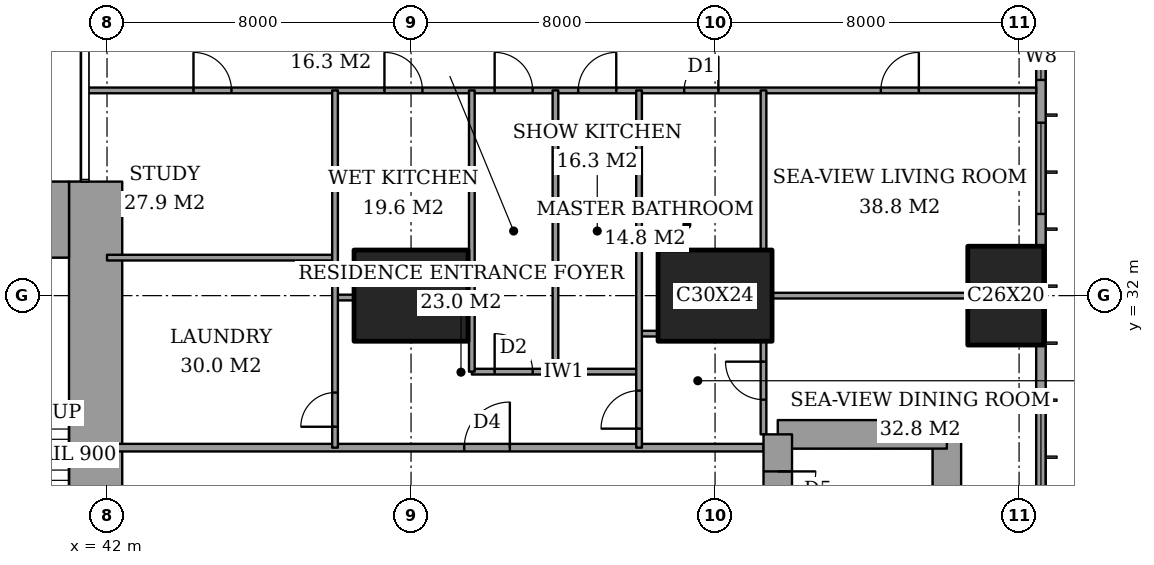
"""IFC4 building model, lengths in metres.
Left out: names, types, materials, properties, quantities, classifications, styles, units other than length and angle.
Written with IfcOpenShell. Run it as: python <this file> out.ifc"""

import sys

from ifc_helpers import new_model, si_unit, direction, frame, frame_2d, origin, origin_2d, place, context, subcontext, project, spatial, rectangle, extrude, element, fill, save


model = new_model("IFC4")
c1 = context("Model", 3, precision=1e-05, world=origin(), true_north=direction((0.0, 1.0)))
c2 = subcontext(c1, "Body", "Model", "MODEL_VIEW")
j1 = project(units=[si_unit("LENGTHUNIT", "METRE"), si_unit("PLANEANGLEUNIT", "RADIAN")], contexts=[c1])
p1 = place(None, origin())
s1 = spatial("IfcSite", under=j1, at=p1, CompositionType="ELEMENT")
p2 = place(p1, origin())
s2 = spatial("IfcBuilding", under=s1, at=p2, CompositionType="ELEMENT")
p3 = place(p2, frame((0.0, 0.0, 87.2)))
s3 = spatial("IfcBuildingStorey", under=s2, at=p3, CompositionType="ELEMENT", Elevation=87.2)
for number, where, z_axis, x_axis in (
    (1, (50.0, 32.0, 0.0), (0.0, 0.0, 1.0), (1.0, 0.0, 0.0)),
    (2, (58.0, 32.0, 0.0), (0.0, 0.0, 1.0), (1.0, 0.0, 0.0)),
):
    element("IfcColumn", number, at=place(p3, frame(where, z_axis=z_axis, x_axis=x_axis)), inside=s3, PredefinedType="COLUMN", context=c2, shape_type="SweptSolid", body=[
        extrude(rectangle(XDim=3.0, YDim=2.4, at=origin_2d()), origin(), (0.0, 0.0, 1.0), 3.6),
    ])
p4 = place(p3, frame((65.65, 32.0, 0.0), z_axis=(0.0, 0.0, 1.0), x_axis=(0.0, 1.0, 0.0)))
e3 = element("IfcColumn", 3, at=p4, inside=s3, PredefinedType="COLUMN", context=c2, shape_type="SweptSolid", body=[
    extrude(rectangle(XDim=2.6, YDim=2.0, at=origin_2d()), origin(), (0.0, 0.0, 1.0), 3.6),
])
p5 = place(p3, frame((37.85, 34.0, 0.0), z_axis=(0.0, 0.0, 1.0), x_axis=(1.0, 0.0, 0.0)))
e4 = element("IfcWall", 4, at=p5, inside=s3, PredefinedType="SHEAR", context=c2, shape_type="SweptSolid", body=[
    extrude(rectangle(XDim=3.15, YDim=2.0, at=frame_2d((1.575, 0.0))), origin(), (0.0, 0.0, 1.0), 3.6),
])
p6 = place(p3, frame((41.7, 24.85, 0.0), z_axis=(0.0, 0.0, 1.0), x_axis=(0.0, 1.0, 0.0)))
e5 = element("IfcWall", 5, at=p6, inside=s3, PredefinedType="SHEAR", context=c2, shape_type="SweptSolid", body=[
    extrude(rectangle(XDim=10.15, YDim=1.4, at=frame_2d((5.075, 0.0))), origin(), (0.0, 0.0, 1.0), 3.6),
])
p7 = place(p3, frame((64.1, 19.65, 0.0), z_axis=(0.0, 0.0, 1.0), x_axis=(0.0, 1.0, 0.0)))
e6 = element("IfcWall", 6, at=p7, inside=s3, PredefinedType="SHEAR", context=c2, shape_type="SweptSolid", body=[
    extrude(rectangle(XDim=8.7, YDim=0.75, at=frame_2d((4.35, 0.0))), origin(), (0.0, 0.0, 1.0), 3.6),
])
p8 = place(p3, frame((64.1, 28.35, 0.0), z_axis=(0.0, 0.0, 1.0), x_axis=(-1.0, 0.0, 0.0)))
e7 = element("IfcWall", 7, at=p8, inside=s3, PredefinedType="SHEAR", context=c2, shape_type="SweptSolid", body=[
    extrude(rectangle(XDim=4.45, YDim=0.75, at=frame_2d((2.225, 0.0))), origin(), (0.0, 0.0, 1.0), 3.6),
])
p9 = place(p3, frame((59.65, 28.35, 0.0), z_axis=(0.0, 0.0, 1.0), x_axis=(0.0, -1.0, 0.0)))
e8 = element("IfcWall", 8, at=p9, inside=s3, PredefinedType="SHEAR", context=c2, shape_type="SweptSolid", body=[
    extrude(rectangle(XDim=8.7, YDim=0.75, at=frame_2d((4.35, 0.0))), origin(), (0.0, 0.0, 1.0), 3.6),
])
p10 = place(p9, frame((0.975, 0.0, 0.0)))
e9 = element("IfcOpeningElement", 9, at=p10, cuts=e8, PredefinedType="OPENING", context=c2, shape_type="SweptSolid", body=[
    extrude(rectangle(XDim=1.0, YDim=2.1, at=frame_2d((0.5, 1.05))), frame((0.0, 0.385, 0.0), z_axis=(0.0, -1.0, 0.0), x_axis=(1.0, 0.0, 0.0)), (0.0, 0.0, 1.0), 0.77),
])
p11 = place(p3, frame((66.575, 3.175, 0.0), z_axis=(0.0, 0.0, 1.0), x_axis=(0.0, 1.0, 0.0)))
e10 = element("IfcWall", 10, at=p11, inside=s3, PredefinedType="SOLIDWALL", context=c2, shape_type="SweptSolid", body=[
    extrude(rectangle(XDim=41.65, YDim=0.25, at=frame_2d((20.825, 0.0))), origin(), (0.0, 0.0, 1.0), 3.6),
])
p12 = place(p11, frame((0.775, 0.0, 0.6)))
e11 = element("IfcOpeningElement", 11, at=p12, cuts=e10, PredefinedType="OPENING", context=c2, shape_type="SweptSolid", body=[
    extrude(rectangle(XDim=2.4, YDim=2.0, at=frame_2d((1.2, 1.0))), frame((0.0, 0.135, 0.0), z_axis=(0.0, -1.0, 0.0), x_axis=(1.0, 0.0, 0.0)), (0.0, 0.0, 1.0), 0.27),
])
p13 = place(p11, frame((6.1, 0.0, 0.6)))
e12 = element("IfcOpeningElement", 12, at=p13, cuts=e10, PredefinedType="OPENING", context=c2, shape_type="SweptSolid", body=[
    extrude(rectangle(XDim=1.2, YDim=2.0, at=frame_2d((0.6, 1.0))), frame((0.0, 0.135, 0.0), z_axis=(0.0, -1.0, 0.0), x_axis=(1.0, 0.0, 0.0)), (0.0, 0.0, 1.0), 0.27),
])
p14 = place(p11, frame((8.275, 0.0, 0.6)))
e13 = element("IfcOpeningElement", 13, at=p14, cuts=e10, PredefinedType="OPENING", context=c2, shape_type="SweptSolid", body=[
    extrude(rectangle(XDim=2.4, YDim=2.0, at=frame_2d((1.2, 1.0))), frame((0.0, 0.135, 0.0), z_axis=(0.0, -1.0, 0.0), x_axis=(1.0, 0.0, 0.0)), (0.0, 0.0, 1.0), 0.27),
])
p15 = place(p11, frame((15.775, 0.0, 0.6)))
e14 = element("IfcOpeningElement", 14, at=p15, cuts=e10, PredefinedType="OPENING", context=c2, shape_type="SweptSolid", body=[
    extrude(rectangle(XDim=2.4, YDim=2.0, at=frame_2d((1.2, 1.0))), frame((0.0, 0.135, 0.0), z_axis=(0.0, -1.0, 0.0), x_axis=(1.0, 0.0, 0.0)), (0.0, 0.0, 1.0), 0.27),
])
p16 = place(p11, frame((23.475, 0.0, 0.6)))
e15 = element("IfcOpeningElement", 15, at=p16, cuts=e10, PredefinedType="OPENING", context=c2, shape_type="SweptSolid", body=[
    extrude(rectangle(XDim=2.4, YDim=2.0, at=frame_2d((1.2, 1.0))), frame((0.0, 0.135, 0.0), z_axis=(0.0, -1.0, 0.0), x_axis=(1.0, 0.0, 0.0)), (0.0, 0.0, 1.0), 0.27),
])
p17 = place(p11, frame((30.975, 0.0, 0.6)))
e16 = element("IfcOpeningElement", 16, at=p17, cuts=e10, PredefinedType="OPENING", context=c2, shape_type="SweptSolid", body=[
    extrude(rectangle(XDim=2.4, YDim=2.0, at=frame_2d((1.2, 1.0))), frame((0.0, 0.135, 0.0), z_axis=(0.0, -1.0, 0.0), x_axis=(1.0, 0.0, 0.0)), (0.0, 0.0, 1.0), 0.27),
])
p18 = place(p11, frame((34.5, 0.0, 0.6)))
e17 = element("IfcOpeningElement", 17, at=p18, cuts=e10, PredefinedType="OPENING", context=c2, shape_type="SweptSolid", body=[
    extrude(rectangle(XDim=1.2, YDim=2.0, at=frame_2d((0.6, 1.0))), frame((0.0, 0.135, 0.0), z_axis=(0.0, -1.0, 0.0), x_axis=(1.0, 0.0, 0.0)), (0.0, 0.0, 1.0), 0.27),
])
p19 = place(p11, frame((38.475, 0.0, 0.6)))
e18 = element("IfcOpeningElement", 18, at=p19, cuts=e10, PredefinedType="OPENING", context=c2, shape_type="SweptSolid", body=[
    extrude(rectangle(XDim=2.4, YDim=2.0, at=frame_2d((1.2, 1.0))), frame((0.0, 0.135, 0.0), z_axis=(0.0, -1.0, 0.0), x_axis=(1.0, 0.0, 0.0)), (0.0, 0.0, 1.0), 0.27),
])
p20 = place(p3, frame((42.0, 28.0, 0.0), z_axis=(0.0, 0.0, 1.0), x_axis=(1.0, 0.0, 0.0)))
e19 = element("IfcWall", 19, at=p20, inside=s3, PredefinedType="PARTITIONING", context=c2, shape_type="SweptSolid", body=[
    extrude(rectangle(XDim=17.275, YDim=0.2, at=frame_2d((8.637, 0.0))), origin(), (0.0, 0.0, 1.0), 3.25),
])
p21 = place(p20, frame((9.4, 0.0, 0.0)))
e20 = element("IfcOpeningElement", 20, at=p21, cuts=e19, PredefinedType="OPENING", context=c2, shape_type="SweptSolid", body=[
    extrude(rectangle(XDim=1.2, YDim=2.4, at=frame_2d((0.6, 1.2))), frame((0.0, 0.11, 0.0), z_axis=(0.0, -1.0, 0.0), x_axis=(1.0, 0.0, 0.0)), (0.0, 0.0, 1.0), 0.22),
])
p22 = place(p3, frame((51.6, 30.0, 0.0), z_axis=(0.0, 0.0, 1.0), x_axis=(1.0, 0.0, 0.0)))
e21 = element("IfcWall", 21, at=p22, inside=s3, PredefinedType="PARTITIONING", context=c2, shape_type="SweptSolid", body=[
    extrude(rectangle(XDim=4.4, YDim=0.15, at=frame_2d((2.2, 0.0))), origin(), (0.0, 0.0, 1.0), 3.25),
])
p23 = place(p22, frame((0.6, 0.0, 0.0)))
e22 = element("IfcOpeningElement", 22, at=p23, cuts=e21, PredefinedType="OPENING", context=c2, shape_type="SweptSolid", body=[
    extrude(rectangle(XDim=1.0, YDim=2.1, at=frame_2d((0.5, 1.05))), frame((0.0, 0.085, 0.0), z_axis=(0.0, -1.0, 0.0), x_axis=(1.0, 0.0, 0.0)), (0.0, 0.0, 1.0), 0.17),
])
for number, where, z_axis, x_axis in (
    (23, (56.0, 31.0, 0.0), (0.0, 0.0, 1.0), (1.0, 0.0, 0.0)),
    (24, (48.0, 31.95, 0.0), (0.0, 0.0, 1.0), (1.0, 0.0, 0.0)),
):
    element("IfcWall", number, at=place(p3, frame(where, z_axis=z_axis, x_axis=x_axis)), inside=s3, PredefinedType="PARTITIONING", context=c2, shape_type="SweptSolid", body=[
        extrude(rectangle(XDim=0.5, YDim=0.15, at=frame_2d((0.25, 0.0))), origin(), (0.0, 0.0, 1.0), 3.25),
    ])
p24 = place(p3, frame((59.5, 32.0, 0.0), z_axis=(0.0, 0.0, 1.0), x_axis=(1.0, 0.0, 0.0)))
e25 = element("IfcWall", 25, at=p24, inside=s3, PredefinedType="PARTITIONING", context=c2, shape_type="SweptSolid", body=[
    extrude(rectangle(XDim=5.15, YDim=0.15, at=frame_2d((2.575, 0.0))), origin(), (0.0, 0.0, 1.0), 3.25),
])
p25 = place(p3, frame((42.0, 33.0, 0.0), z_axis=(0.0, 0.0, 1.0), x_axis=(1.0, 0.0, 0.0)))
e26 = element("IfcWall", 26, at=p25, inside=s3, PredefinedType="PARTITIONING", context=c2, shape_type="SweptSolid", body=[
    extrude(rectangle(XDim=6.0, YDim=0.15, at=frame_2d((3.0, 0.0))), origin(), (0.0, 0.0, 1.0), 3.25),
])
p26 = place(p3, frame((41.439, 37.4, 0.0), z_axis=(0.0, 0.0, 1.0), x_axis=(1.0, 0.0, 0.0)))
e27 = element("IfcWall", 27, at=p26, inside=s3, PredefinedType="PARTITIONING", context=c2, shape_type="SweptSolid", body=[
    extrude(rectangle(XDim=25.011, YDim=0.15, at=frame_2d((12.505, 0.0))), origin(), (0.0, 0.0, 1.0), 3.25),
])
p27 = place(p26, frame((10.761, 0.0, 0.0)))
e28 = element("IfcOpeningElement", 28, at=p27, cuts=e27, PredefinedType="OPENING", context=c2, shape_type="SweptSolid", body=[
    extrude(rectangle(XDim=1.0, YDim=2.1, at=frame_2d((0.5, 1.05))), frame((0.0, 0.085, 0.0), z_axis=(0.0, -1.0, 0.0), x_axis=(1.0, 0.0, 0.0)), (0.0, 0.0, 1.0), 0.17),
])
p28 = place(p26, frame((20.924, 0.0, 0.0)))
e29 = element("IfcOpeningElement", 29, at=p28, cuts=e27, PredefinedType="OPENING", context=c2, shape_type="SweptSolid", body=[
    extrude(rectangle(XDim=1.0, YDim=2.1, at=frame_2d((0.5, 1.05))), frame((0.0, 0.085, 0.0), z_axis=(0.0, -1.0, 0.0), x_axis=(1.0, 0.0, 0.0)), (0.0, 0.0, 1.0), 0.17),
])
p29 = place(p26, frame((15.749, 0.0, 0.0)))
e30 = element("IfcOpeningElement", 30, at=p29, cuts=e27, PredefinedType="OPENING", context=c2, shape_type="SweptSolid", body=[
    extrude(rectangle(XDim=0.9, YDim=2.1, at=frame_2d((0.45, 1.05))), frame((0.0, 0.085, 0.0), z_axis=(0.0, -1.0, 0.0), x_axis=(1.0, 0.0, 0.0)), (0.0, 0.0, 1.0), 0.17),
])
p30 = place(p26, frame((12.961, 0.0, 0.0)))
e31 = element("IfcOpeningElement", 31, at=p30, cuts=e27, PredefinedType="OPENING", context=c2, shape_type="SweptSolid", body=[
    extrude(rectangle(XDim=1.0, YDim=2.1, at=frame_2d((0.5, 1.05))), frame((0.0, 0.085, 0.0), z_axis=(0.0, -1.0, 0.0), x_axis=(1.0, 0.0, 0.0)), (0.0, 0.0, 1.0), 0.17),
])
p31 = place(p26, frame((7.861, 0.0, 0.0)))
e32 = element("IfcOpeningElement", 32, at=p31, cuts=e27, PredefinedType="OPENING", context=c2, shape_type="SweptSolid", body=[
    extrude(rectangle(XDim=1.0, YDim=2.1, at=frame_2d((0.5, 1.05))), frame((0.0, 0.085, 0.0), z_axis=(0.0, -1.0, 0.0), x_axis=(1.0, 0.0, 0.0)), (0.0, 0.0, 1.0), 0.17),
])
p32 = place(p26, frame((2.836, 0.0, 0.0)))
e33 = element("IfcOpeningElement", 33, at=p32, cuts=e27, PredefinedType="OPENING", context=c2, shape_type="SweptSolid", body=[
    extrude(rectangle(XDim=1.0, YDim=2.1, at=frame_2d((0.5, 1.05))), frame((0.0, 0.085, 0.0), z_axis=(0.0, -1.0, 0.0), x_axis=(1.0, 0.0, 0.0)), (0.0, 0.0, 1.0), 0.17),
])
p33 = place(p3, frame((48.0, 28.0, 0.0), z_axis=(0.0, 0.0, 1.0), x_axis=(0.0, 1.0, 0.0)))
e34 = element("IfcWall", 34, at=p33, inside=s3, PredefinedType="PARTITIONING", context=c2, shape_type="SweptSolid", body=[
    extrude(rectangle(XDim=9.4, YDim=0.15, at=frame_2d((4.7, 0.0))), origin(), (0.0, 0.0, 1.0), 3.25),
])
p34 = place(p33, frame((0.55, 0.0, 0.0)))
e35 = element("IfcOpeningElement", 35, at=p34, cuts=e34, PredefinedType="OPENING", context=c2, shape_type="SweptSolid", body=[
    extrude(rectangle(XDim=0.9, YDim=2.1, at=frame_2d((0.45, 1.05))), frame((0.0, 0.085, 0.0), z_axis=(0.0, -1.0, 0.0), x_axis=(1.0, 0.0, 0.0)), (0.0, 0.0, 1.0), 0.17),
])
for number, where, z_axis, x_axis in (
    (36, (51.6, 30.0, 0.0), (0.0, 0.0, 1.0), (0.0, 1.0, 0.0)),
    (37, (53.8, 30.0, 0.0), (0.0, 0.0, 1.0), (0.0, 1.0, 0.0)),
):
    element("IfcWall", number, at=place(p3, frame(where, z_axis=z_axis, x_axis=x_axis)), inside=s3, PredefinedType="PARTITIONING", context=c2, shape_type="SweptSolid", body=[
        extrude(rectangle(XDim=7.4, YDim=0.15, at=frame_2d((3.7, 0.0))), origin(), (0.0, 0.0, 1.0), 3.25),
    ])
p35 = place(p3, frame((56.0, 28.0, 0.0), z_axis=(0.0, 0.0, 1.0), x_axis=(0.0, 1.0, 0.0)))
e38 = element("IfcWall", 38, at=p35, inside=s3, PredefinedType="PARTITIONING", context=c2, shape_type="SweptSolid", body=[
    extrude(rectangle(XDim=9.4, YDim=0.15, at=frame_2d((4.7, 0.0))), origin(), (0.0, 0.0, 1.0), 3.25),
])
p36 = place(p35, frame((0.5, 0.0, 0.0)))
e39 = element("IfcOpeningElement", 39, at=p36, cuts=e38, PredefinedType="OPENING", context=c2, shape_type="SweptSolid", body=[
    extrude(rectangle(XDim=1.0, YDim=2.1, at=frame_2d((0.5, 1.05))), frame((0.0, 0.085, 0.0), z_axis=(0.0, -1.0, 0.0), x_axis=(1.0, 0.0, 0.0)), (0.0, 0.0, 1.0), 0.17),
])
p37 = place(p3, frame((59.275, 28.35, 0.0), z_axis=(0.0, 0.0, 1.0), x_axis=(0.0, 1.0, 0.0)))
e40 = element("IfcWall", 40, at=p37, inside=s3, PredefinedType="PARTITIONING", context=c2, shape_type="SweptSolid", body=[
    extrude(rectangle(XDim=2.45, YDim=0.15, at=frame_2d((1.225, 0.0))), origin(), (0.0, 0.0, 1.0), 3.25),
])
p38 = place(p37, frame((0.913, 0.0, 0.0)))
e41 = element("IfcOpeningElement", 41, at=p38, cuts=e40, PredefinedType="OPENING", context=c2, shape_type="SweptSolid", body=[
    extrude(rectangle(XDim=1.0, YDim=2.1, at=frame_2d((0.5, 1.05))), frame((0.0, 0.085, 0.0), z_axis=(0.0, -1.0, 0.0), x_axis=(1.0, 0.0, 0.0)), (0.0, 0.0, 1.0), 0.17),
])
p39 = place(p3, frame((59.275, 33.2, 0.0), z_axis=(0.0, 0.0, 1.0), x_axis=(0.0, 1.0, 0.0)))
e42 = element("IfcWall", 42, at=p39, inside=s3, PredefinedType="PARTITIONING", context=c2, shape_type="SweptSolid", body=[
    extrude(rectangle(XDim=4.2, YDim=0.15, at=frame_2d((2.1, 0.0))), origin(), (0.0, 0.0, 1.0), 3.25),
])
p40 = place(p16, origin())
e43 = element("IfcWindow", 43, at=p40, inside=s3, PartitioningType="SINGLE_PANEL", PredefinedType="WINDOW", context=c2, shape_type="SweptSolid", body=[
    extrude(rectangle(XDim=2.4, YDim=2.0, at=frame_2d((1.2, 1.0))), frame((0.0, 0.03, 0.0), z_axis=(0.0, -1.0, 0.0), x_axis=(1.0, 0.0, 0.0)), (0.0, 0.0, 1.0), 0.06),
])
fill(e15, e43)
p41 = place(p17, origin())
e44 = element("IfcWindow", 44, at=p41, inside=s3, PartitioningType="SINGLE_PANEL", PredefinedType="WINDOW", context=c2, shape_type="SweptSolid", body=[
    extrude(rectangle(XDim=2.4, YDim=2.0, at=frame_2d((1.2, 1.0))), frame((0.0, 0.03, 0.0), z_axis=(0.0, -1.0, 0.0), x_axis=(1.0, 0.0, 0.0)), (0.0, 0.0, 1.0), 0.06),
])
fill(e16, e44)
p42 = place(p18, origin())
e45 = element("IfcWindow", 45, at=p42, inside=s3, PartitioningType="SINGLE_PANEL", PredefinedType="WINDOW", context=c2, shape_type="SweptSolid", body=[
    extrude(rectangle(XDim=1.2, YDim=2.0, at=frame_2d((0.6, 1.0))), frame((0.0, 0.03, 0.0), z_axis=(0.0, -1.0, 0.0), x_axis=(1.0, 0.0, 0.0)), (0.0, 0.0, 1.0), 0.06),
])
fill(e17, e45)
p43 = place(p27, origin())
e46 = element("IfcDoor", 46, at=p43, inside=s3, OperationType="SINGLE_SWING_RIGHT", PredefinedType="DOOR", context=c2, shape_type="SweptSolid", body=[
    extrude(rectangle(XDim=1.0, YDim=2.1, at=frame_2d((0.5, 1.05))), frame((0.0, 0.025, 0.0), z_axis=(0.0, -1.0, 0.0), x_axis=(1.0, 0.0, 0.0)), (0.0, 0.0, 1.0), 0.05),
])
fill(e28, e46)
p44 = place(p28, origin())
e47 = element("IfcDoor", 47, at=p44, inside=s3, OperationType="SINGLE_SWING_LEFT", PredefinedType="DOOR", context=c2, shape_type="SweptSolid", body=[
    extrude(rectangle(XDim=1.0, YDim=2.1, at=frame_2d((0.5, 1.05))), frame((0.0, 0.025, 0.0), z_axis=(0.0, -1.0, 0.0), x_axis=(1.0, 0.0, 0.0)), (0.0, 0.0, 1.0), 0.05),
])
fill(e29, e47)
p45 = place(p38, origin())
e48 = element("IfcDoor", 48, at=p45, inside=s3, OperationType="SINGLE_SWING_LEFT", PredefinedType="DOOR", context=c2, shape_type="SweptSolid", body=[
    extrude(rectangle(XDim=1.0, YDim=2.1, at=frame_2d((0.5, 1.05))), frame((0.0, 0.025, 0.0), z_axis=(0.0, -1.0, 0.0), x_axis=(1.0, 0.0, 0.0)), (0.0, 0.0, 1.0), 0.05),
])
fill(e41, e48)
p46 = place(p29, origin())
e49 = element("IfcDoor", 49, at=p46, inside=s3, OperationType="SINGLE_SWING_LEFT", PredefinedType="DOOR", context=c2, shape_type="SweptSolid", body=[
    extrude(rectangle(XDim=0.9, YDim=2.1, at=frame_2d((0.45, 1.05))), frame((0.0, 0.025, 0.0), z_axis=(0.0, -1.0, 0.0), x_axis=(1.0, 0.0, 0.0)), (0.0, 0.0, 1.0), 0.05),
])
fill(e30, e49)
p47 = place(p36, origin())
e50 = element("IfcDoor", 50, at=p47, inside=s3, OperationType="SINGLE_SWING_RIGHT", PredefinedType="DOOR", context=c2, shape_type="SweptSolid", body=[
    extrude(rectangle(XDim=1.0, YDim=2.1, at=frame_2d((0.5, 1.05))), frame((0.0, 0.025, 0.0), z_axis=(0.0, -1.0, 0.0), x_axis=(1.0, 0.0, 0.0)), (0.0, 0.0, 1.0), 0.05),
])
fill(e39, e50)
p48 = place(p21, origin())
e51 = element("IfcDoor", 51, at=p48, inside=s3, OperationType="SINGLE_SWING_LEFT", PredefinedType="DOOR", context=c2, shape_type="SweptSolid", body=[
    extrude(rectangle(XDim=1.2, YDim=2.4, at=frame_2d((0.6, 1.2))), frame((0.0, 0.025, 0.0), z_axis=(0.0, -1.0, 0.0), x_axis=(1.0, 0.0, 0.0)), (0.0, 0.0, 1.0), 0.05),
])
fill(e20, e51)
p49 = place(p30, origin())
e52 = element("IfcDoor", 52, at=p49, inside=s3, OperationType="SINGLE_SWING_LEFT", PredefinedType="DOOR", context=c2, shape_type="SweptSolid", body=[
    extrude(rectangle(XDim=1.0, YDim=2.1, at=frame_2d((0.5, 1.05))), frame((0.0, 0.025, 0.0), z_axis=(0.0, -1.0, 0.0), x_axis=(1.0, 0.0, 0.0)), (0.0, 0.0, 1.0), 0.05),
])
fill(e31, e52)
p50 = place(p23, origin())
e53 = element("IfcDoor", 53, at=p50, inside=s3, OperationType="SINGLE_SWING_RIGHT", PredefinedType="DOOR", context=c2, shape_type="SweptSolid", body=[
    extrude(rectangle(XDim=1.0, YDim=2.1, at=frame_2d((0.5, 1.05))), frame((0.0, 0.025, 0.0), z_axis=(0.0, -1.0, 0.0), x_axis=(1.0, 0.0, 0.0)), (0.0, 0.0, 1.0), 0.05),
])
fill(e22, e53)
p51 = place(p31, origin())
e54 = element("IfcDoor", 54, at=p51, inside=s3, OperationType="SINGLE_SWING_RIGHT", PredefinedType="DOOR", context=c2, shape_type="SweptSolid", body=[
    extrude(rectangle(XDim=1.0, YDim=2.1, at=frame_2d((0.5, 1.05))), frame((0.0, 0.025, 0.0), z_axis=(0.0, -1.0, 0.0), x_axis=(1.0, 0.0, 0.0)), (0.0, 0.0, 1.0), 0.05),
])
fill(e32, e54)
p52 = place(p32, origin())
e55 = element("IfcDoor", 55, at=p52, inside=s3, OperationType="SINGLE_SWING_RIGHT", PredefinedType="DOOR", context=c2, shape_type="SweptSolid", body=[
    extrude(rectangle(XDim=1.0, YDim=2.1, at=frame_2d((0.5, 1.05))), frame((0.0, 0.025, 0.0), z_axis=(0.0, -1.0, 0.0), x_axis=(1.0, 0.0, 0.0)), (0.0, 0.0, 1.0), 0.05),
])
fill(e33, e55)
p53 = place(p34, origin())
e56 = element("IfcDoor", 56, at=p53, inside=s3, OperationType="SINGLE_SWING_RIGHT", PredefinedType="DOOR", context=c2, shape_type="SweptSolid", body=[
    extrude(rectangle(XDim=0.9, YDim=2.1, at=frame_2d((0.45, 1.05))), frame((0.0, 0.025, 0.0), z_axis=(0.0, -1.0, 0.0), x_axis=(1.0, 0.0, 0.0)), (0.0, 0.0, 1.0), 0.05),
])
fill(e35, e56)
p54 = place(p10, origin())
e57 = element("IfcDoor", 57, at=p54, inside=s3, OperationType="SINGLE_SWING_RIGHT", PredefinedType="DOOR", context=c2, shape_type="SweptSolid", body=[
    extrude(rectangle(XDim=1.0, YDim=2.1, at=frame_2d((0.5, 1.05))), frame((0.0, 0.025, 0.0), z_axis=(0.0, -1.0, 0.0), x_axis=(1.0, 0.0, 0.0)), (0.0, 0.0, 1.0), 0.05),
])
fill(e9, e57)
save(model, sys.argv[1])
